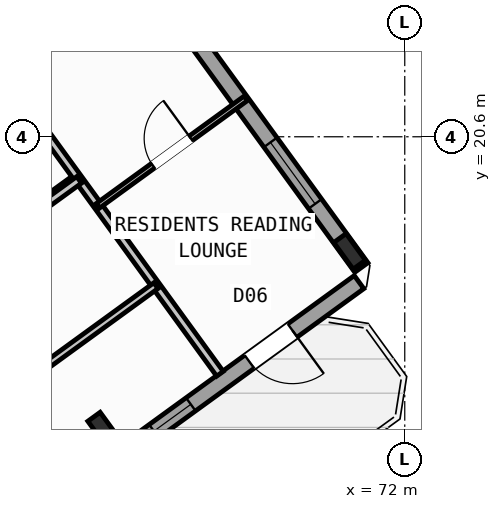
"""IFC4 building model, lengths in metres.
Left out: names, types, materials, properties, quantities, classifications, styles, units other than length and angle.
Written with IfcOpenShell. Run it as: python <this file> out.ifc"""

import sys

from ifc_helpers import new_model, si_unit, direction, frame, frame_2d, origin, origin_2d, place, context, subcontext, project, spatial, rectangle, i_section, extrude, source, transform, mapped, element, fill, save


model = new_model("IFC4")
c1 = context("Model", 3, precision=1e-05, world=origin(), true_north=direction((0.0, 1.0)))
c2 = subcontext(c1, "Body", "Model", "MODEL_VIEW")
j1 = project(units=[si_unit("LENGTHUNIT", "METRE"), si_unit("PLANEANGLEUNIT", "RADIAN")], contexts=[c1])
p1 = place(None, origin())
s1 = spatial("IfcSite", under=j1, at=p1, CompositionType="ELEMENT")
p2 = place(p1, origin())
s2 = spatial("IfcBuilding", under=s1, at=p2, CompositionType="ELEMENT")
p3 = place(p2, frame((0.0, 0.0, 27.6)))
s3 = spatial("IfcBuildingStorey", under=s2, at=p3, CompositionType="ELEMENT", Elevation=27.6)
m1 = source(origin(), c2, "Body", "SweptSolid", [
    extrude(i_section(OverallWidth=0.3, OverallDepth=0.65, WebThickness=0.016, FlangeThickness=0.031, at=origin_2d()), origin(), (0.0, 0.0, 1.0), 3.6),
])
for number, where, z_axis, x_axis in (
    (1, (66.058, 14.811, 0.0), (0.0, 0.0, 1.0), (0.809, 0.588, 0.0)),
    (2, (70.912, 18.338, 0.0), (0.0, 0.0, 1.0), (0.809, 0.588, 0.0)),
):
    element("IfcColumn", number, at=place(p3, frame(where, z_axis=z_axis, x_axis=x_axis)), inside=s3, PredefinedType="COLUMN", context=c2, shape_type="MappedRepresentation", body=[
        mapped(m1, transform((0.0, 0.0, 0.0), scale=1.0)),
    ])
p4 = place(p3, frame((58.455, 35.484, 0.0), z_axis=(0.0, 0.0, 1.0), x_axis=(0.587783625747, -0.809018176127, 0.0)))
e3 = element("IfcWall", 3, at=p4, inside=s3, PredefinedType="STANDARD", context=c2, shape_type="SweptSolid", body=[
    extrude(rectangle(XDim=21.587, YDim=0.32, at=frame_2d((10.794, 0.0))), origin(), (0.0, 0.0, 1.0), 2.725),
])
p5 = place(p4, frame((2.994, 0.0, 0.8)))
e4 = element("IfcOpeningElement", 4, at=p5, cuts=e3, PredefinedType="OPENING", context=c2, shape_type="SweptSolid", body=[
    extrude(rectangle(XDim=2.1, YDim=1.55, at=frame_2d((1.05, 0.775))), frame((0.0, 0.17, 0.0), z_axis=(0.0, -1.0, 0.0), x_axis=(1.0, 0.0, 0.0)), (0.0, 0.0, 1.0), 0.34),
])
p6 = place(p4, frame((11.934, 0.0, 0.85)))
e5 = element("IfcOpeningElement", 5, at=p6, cuts=e3, PredefinedType="OPENING", context=c2, shape_type="SweptSolid", body=[
    extrude(rectangle(XDim=1.8, YDim=1.5, at=frame_2d((0.9, 0.75))), frame((0.0, 0.17, 0.0), z_axis=(0.0, -1.0, 0.0), x_axis=(1.0, 0.0, 0.0)), (0.0, 0.0, 1.0), 0.34),
])
p7 = place(p4, frame((18.535, 0.0, 0.85)))
e6 = element("IfcOpeningElement", 6, at=p7, cuts=e3, PredefinedType="OPENING", context=c2, shape_type="SweptSolid", body=[
    extrude(rectangle(XDim=1.5, YDim=1.5, at=frame_2d((0.75, 0.75))), frame((0.0, 0.17, 0.0), z_axis=(0.0, -1.0, 0.0), x_axis=(1.0, 0.0, 0.0)), (0.0, 0.0, 1.0), 0.34),
])
p8 = place(p3, frame((71.098, 17.731, 0.0), z_axis=(0.0, 0.0, 1.0), x_axis=(-0.809021120468, -0.587779573171, 0.0)))
e7 = element("IfcWall", 7, at=p8, inside=s3, PredefinedType="STANDARD", context=c2, shape_type="SweptSolid", body=[
    extrude(rectangle(XDim=17.588, YDim=0.32, at=frame_2d((8.794, 0.0))), origin(), (0.0, 0.0, 1.0), 3.35),
])
p9 = place(p8, frame((1.624, 0.0, 0.0)))
e8 = element("IfcOpeningElement", 8, at=p9, cuts=e7, PredefinedType="OPENING", context=c2, shape_type="SweptSolid", body=[
    extrude(rectangle(XDim=1.05, YDim=2.15, at=frame_2d((0.525, 1.075))), frame((0.0, 0.17, 0.0), z_axis=(0.0, -1.0, 0.0), x_axis=(1.0, 0.0, 0.0)), (0.0, 0.0, 1.0), 0.34),
])
p10 = place(p8, frame((4.104, 0.0, 1.0)))
e9 = element("IfcOpeningElement", 9, at=p10, cuts=e7, PredefinedType="OPENING", context=c2, shape_type="SweptSolid", body=[
    extrude(rectangle(XDim=0.9, YDim=1.25, at=frame_2d((0.45, 0.625))), frame((0.0, 0.17, 0.0), z_axis=(0.0, -1.0, 0.0), x_axis=(1.0, 0.0, 0.0)), (0.0, 0.0, 1.0), 0.34),
])
p11 = place(p8, frame((7.879, 0.0, 0.85)))
e10 = element("IfcOpeningElement", 10, at=p11, cuts=e7, PredefinedType="OPENING", context=c2, shape_type="SweptSolid", body=[
    extrude(rectangle(XDim=1.8, YDim=1.5, at=frame_2d((0.9, 0.75))), frame((0.0, 0.17, 0.0), z_axis=(0.0, -1.0, 0.0), x_axis=(1.0, 0.0, 0.0)), (0.0, 0.0, 1.0), 0.34),
])
p12 = place(p8, frame((12.849, 0.0, 0.85)))
e11 = element("IfcOpeningElement", 11, at=p12, cuts=e7, PredefinedType="OPENING", context=c2, shape_type="SweptSolid", body=[
    extrude(rectangle(XDim=1.8, YDim=1.5, at=frame_2d((0.9, 0.75))), frame((0.0, 0.17, 0.0), z_axis=(0.0, -1.0, 0.0), x_axis=(1.0, 0.0, 0.0)), (0.0, 0.0, 1.0), 0.34),
])
p13 = place(p3, frame((63.507, 18.322, 0.0), z_axis=(0.0, 0.0, 1.0), x_axis=(0.809034604122, 0.587761013791, 0.0)))
e12 = element("IfcWall", 12, at=p13, inside=s3, PredefinedType="PARTITIONING", context=c2, shape_type="SweptSolid", body=[
    extrude(rectangle(XDim=2.51, YDim=0.16, at=frame_2d((1.255, 0.0))), origin(), (0.0, 0.0, 1.0), 3.34),
])
p14 = place(p3, frame((68.353, 15.922, 0.0), z_axis=(0.0, 0.0, 1.0), x_axis=(-0.587783168305, 0.809018508476, 0.0)))
e13 = element("IfcWall", 13, at=p14, inside=s3, PredefinedType="PARTITIONING", context=c2, shape_type="SweptSolid", body=[
    extrude(rectangle(XDim=10.65, YDim=0.16, at=frame_2d((5.325, 0.0))), origin(), (0.0, 0.0, 1.0), 3.34),
])
p15 = place(p3, frame((65.944, 19.238, 0.0), z_axis=(0.0, 0.0, 1.0), x_axis=(0.809013833588, 0.587789602718, 0.0)))
e14 = element("IfcWall", 14, at=p15, inside=s3, PredefinedType="PARTITIONING", context=c2, shape_type="SweptSolid", body=[
    extrude(rectangle(XDim=3.61, YDim=0.11, at=frame_2d((1.805, 0.0))), origin(), (0.0, 0.0, 1.0), 3.34),
])
p16 = place(p15, frame((1.345, 0.0, 0.0)))
e15 = element("IfcOpeningElement", 15, at=p16, cuts=e14, PredefinedType="OPENING", context=c2, shape_type="SweptSolid", body=[
    extrude(rectangle(XDim=0.92, YDim=2.08, at=frame_2d((0.46, 1.04))), frame((0.0, 0.065, 0.0), z_axis=(0.0, -1.0, 0.0), x_axis=(1.0, 0.0, 0.0)), (0.0, 0.0, 1.0), 0.13),
])
p17 = place(p3, frame((53.705, 11.126, 0.0), z_axis=(0.0, 0.0, 1.0), x_axis=(0.809014504436, 0.587788679384, 0.0)))
e16 = element("IfcWall", 16, at=p17, inside=s3, PredefinedType="PARTITIONING", context=c2, shape_type="SweptSolid", body=[
    extrude(rectangle(XDim=14.67, YDim=0.16, at=frame_2d((7.335, 0.0))), origin(), (0.0, 0.0, 1.0), 3.34),
])
p18 = place(p17, frame((10.2, 0.0, 0.0)))
e17 = element("IfcOpeningElement", 17, at=p18, cuts=e16, PredefinedType="OPENING", context=c2, shape_type="SweptSolid", body=[
    extrude(rectangle(XDim=1.0, YDim=2.1, at=frame_2d((0.5, 1.05))), frame((0.0, 0.09, 0.0), z_axis=(0.0, -1.0, 0.0), x_axis=(1.0, 0.0, 0.0)), (0.0, 0.0, 1.0), 0.18),
])
p19 = place(p3, frame((56.249, 9.785, 0.0), z_axis=(0.0, 0.0, 1.0), x_axis=(0.809011747655, 0.587792473715, 0.0)))
e18 = element("IfcWall", 18, at=p19, inside=s3, PredefinedType="PLUMBINGWALL", context=c2, shape_type="SweptSolid", body=[
    extrude(rectangle(XDim=13.4, YDim=0.14, at=frame_2d((6.7, 0.0))), origin(), (0.0, 0.0, 1.0), 3.34),
])
p20 = place(p19, frame((8.94, 0.0, 0.0)))
e19 = element("IfcOpeningElement", 19, at=p20, cuts=e18, PredefinedType="OPENING", context=c2, shape_type="SweptSolid", body=[
    extrude(rectangle(XDim=0.92, YDim=2.08, at=frame_2d((0.46, 1.04))), frame((0.0, 0.08, 0.0), z_axis=(0.0, -1.0, 0.0), x_axis=(1.0, 0.0, 0.0)), (0.0, 0.0, 1.0), 0.16),
])
m2 = source(origin(), c2, "Body", "SweptSolid", [
    extrude(rectangle(XDim=1.05, YDim=2.15, at=frame_2d((0.525, 1.075))), frame((0.0, 0.025, 0.0), z_axis=(0.0, -1.0, 0.0), x_axis=(1.0, 0.0, 0.0)), (0.0, 0.0, 1.0), 0.05),
])
p21 = place(p9, origin())
e20 = element("IfcDoor", 20, at=p21, inside=s3, OperationType="SINGLE_SWING_LEFT", PredefinedType="DOOR", context=c2, shape_type="MappedRepresentation", body=[
    mapped(m2, transform((0.0, 0.0, 0.0), scale=1.0)),
])
fill(e8, e20)
m3 = source(origin(), c2, "Body", "SweptSolid", [
    extrude(rectangle(XDim=1.5, YDim=1.5, at=frame_2d((0.75, 0.75))), frame((0.0, 0.03, 0.0), z_axis=(0.0, -1.0, 0.0), x_axis=(1.0, 0.0, 0.0)), (0.0, 0.0, 1.0), 0.06),
])
p22 = place(p7, origin())
e21 = element("IfcWindow", 21, at=p22, inside=s3, PartitioningType="SINGLE_PANEL", PredefinedType="WINDOW", context=c2, shape_type="MappedRepresentation", body=[
    mapped(m3, transform((0.0, 0.0, 0.0), scale=1.0)),
])
fill(e6, e21)
m4 = source(origin(), c2, "Body", "SweptSolid", [
    extrude(rectangle(XDim=0.9, YDim=1.25, at=frame_2d((0.45, 0.625))), frame((0.0, 0.03, 0.0), z_axis=(0.0, -1.0, 0.0), x_axis=(1.0, 0.0, 0.0)), (0.0, 0.0, 1.0), 0.06),
])
p23 = place(p10, origin())
e22 = element("IfcWindow", 22, at=p23, inside=s3, PartitioningType="SINGLE_PANEL", PredefinedType="WINDOW", context=c2, shape_type="MappedRepresentation", body=[
    mapped(m4, transform((0.0, 0.0, 0.0), scale=1.0)),
])
fill(e9, e22)
m5 = source(origin(), c2, "Body", "SweptSolid", [
    extrude(rectangle(XDim=0.92, YDim=2.08, at=frame_2d((0.46, 1.04))), frame((0.0, 0.025, 0.0), z_axis=(0.0, -1.0, 0.0), x_axis=(1.0, 0.0, 0.0)), (0.0, 0.0, 1.0), 0.05),
])
p24 = place(p16, origin())
e23 = element("IfcDoor", 23, at=p24, inside=s3, OperationType="SINGLE_SWING_RIGHT", PredefinedType="DOOR", context=c2, shape_type="MappedRepresentation", body=[
    mapped(m5, transform((0.0, 0.0, 0.0), scale=1.0)),
])
fill(e15, e23)
save(model, sys.argv[1])
